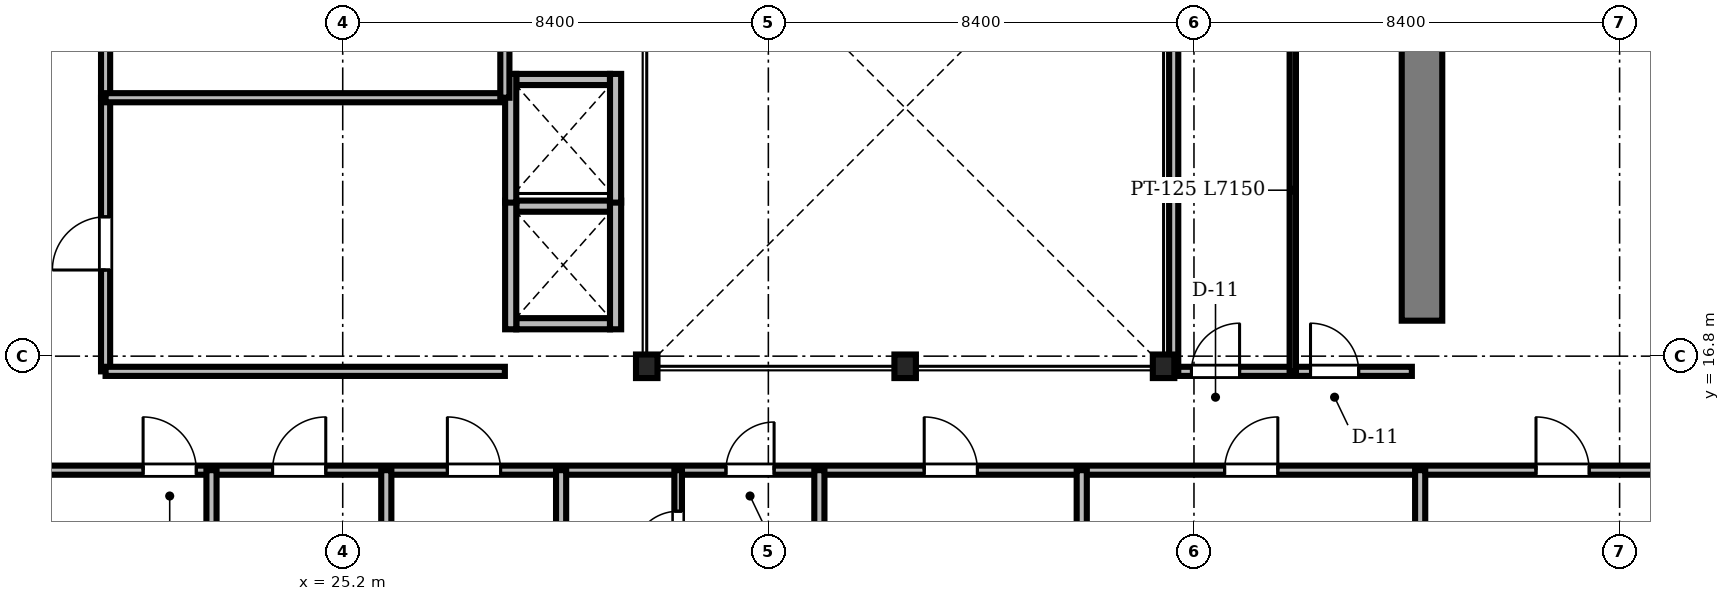
"""IFC4 building model, lengths in metres.
Left out: names, types, materials, properties, quantities, classifications, styles, units other than length and angle.
Written with IfcOpenShell. Run it as: python <this file> out.ifc"""

import sys

from ifc_helpers import new_model, si_unit, direction, frame, frame_2d, origin, origin_2d, place, context, subcontext, project, spatial, rectangle, i_section, extrude, source, transform, mapped, element, fill, save


model = new_model("IFC4")
c1 = context("Model", 3, precision=1e-05, world=origin(), true_north=direction((0.0, 1.0)))
c2 = subcontext(c1, "Body", "Model", "MODEL_VIEW")
j1 = project(units=[si_unit("LENGTHUNIT", "METRE"), si_unit("PLANEANGLEUNIT", "RADIAN")], contexts=[c1])
p1 = place(None, origin())
s1 = spatial("IfcSite", under=j1, at=p1, CompositionType="ELEMENT")
p2 = place(p1, origin())
s2 = spatial("IfcBuilding", under=s1, at=p2, CompositionType="ELEMENT")
p3 = place(p2, frame((0.0, 0.0, 111.3)))
s3 = spatial("IfcBuildingStorey", under=s2, at=p3, CompositionType="ELEMENT", Elevation=111.3)
m1 = source(origin(), c2, "Body", "SweptSolid", [
    extrude(rectangle(XDim=13.15, YDim=0.8, at=frame_2d((6.575, 0.0))), origin(), (0.0, 0.0, 1.0), 3.46),
])
p4 = place(p3, frame((46.5, 17.5, 0.0), z_axis=(0.0, 0.0, 1.0), x_axis=(0.0, 1.0, 0.0)))
e1 = element("IfcWall", 1, at=p4, inside=s3, PredefinedType="SHEAR", context=c2, shape_type="MappedRepresentation", body=[
    mapped(m1, transform((0.0, 0.0, 0.0), scale=1.0)),
])
m2 = source(origin(), c2, "Body", "SweptSolid", [
    extrude(i_section(OverallWidth=0.424, OverallDepth=0.465, WebThickness=0.035, FlangeThickness=0.056, FilletRadius=0.015, at=origin_2d()), origin(), (0.0, 0.0, 1.0), 3.46),
])
for number, where, z_axis, x_axis in (
    (2, (31.2, 16.6, 0.0), (0.0, 0.0, 1.0), (1.0, 0.0, 0.0)),
    (3, (36.3, 16.6, 0.0), (0.0, 0.0, 1.0), (1.0, 0.0, 0.0)),
    (4, (41.4, 16.6, 0.0), (0.0, 0.0, 1.0), (1.0, 0.0, 0.0)),
):
    element("IfcColumn", number, at=place(p3, frame(where, z_axis=z_axis, x_axis=x_axis)), inside=s3, PredefinedType="COLUMN", context=c2, shape_type="MappedRepresentation", body=[
        mapped(m2, transform((0.0, 0.0, 0.0), scale=1.0)),
    ])
m3 = source(origin(), c2, "Body", "SweptSolid", [
    extrude(rectangle(XDim=1.85, YDim=0.22, at=frame_2d((0.925, 0.0))), origin(), (0.0, 0.0, 1.0), 3.46),
])
for number, where, z_axis, x_axis in (
    (5, (28.625, 17.44, 0.0), (0.0, 0.0, 1.0), (1.0, 0.0, 0.0)),
    (6, (28.625, 19.76, 0.0), (0.0, 0.0, 1.0), (1.0, 0.0, 0.0)),
):
    element("IfcWall", number, at=place(p3, frame(where, z_axis=z_axis, x_axis=x_axis)), inside=s3, PredefinedType="SOLIDWALL", context=c2, shape_type="MappedRepresentation", body=[
        mapped(m3, transform((0.0, 0.0, 0.0), scale=1.0)),
    ])
m4 = source(origin(), c2, "Body", "SweptSolid", [
    extrude(rectangle(XDim=2.54, YDim=0.22, at=frame_2d((1.27, 0.0))), origin(), (0.0, 0.0, 1.0), 3.46),
])
for number, where, z_axis, x_axis in (
    (7, (28.515, 17.33, 0.0), (0.0, 0.0, 1.0), (0.0, 1.0, 0.0)),
    (8, (30.585, 17.33, 0.0), (0.0, 0.0, 1.0), (0.0, 1.0, 0.0)),
):
    element("IfcWall", number, at=place(p3, frame(where, z_axis=z_axis, x_axis=x_axis)), inside=s3, PredefinedType="SOLIDWALL", context=c2, shape_type="MappedRepresentation", body=[
        mapped(m4, transform((0.0, 0.0, 0.0), scale=1.0)),
    ])
p5 = place(p3, frame((28.625, 22.26, 0.0), z_axis=(0.0, 0.0, 1.0), x_axis=(1.0, 0.0, 0.0)))
e9 = element("IfcWall", 9, at=p5, inside=s3, PredefinedType="SOLIDWALL", context=c2, shape_type="MappedRepresentation", body=[
    mapped(m3, transform((0.0, 0.0, 0.0), scale=1.0)),
])
for number, where, z_axis, x_axis in (
    (10, (28.515, 19.83, 0.0), (0.0, 0.0, 1.0), (0.0, 1.0, 0.0)),
    (11, (30.585, 19.83, 0.0), (0.0, 0.0, 1.0), (0.0, 1.0, 0.0)),
):
    element("IfcWall", number, at=place(p3, frame(where, z_axis=z_axis, x_axis=x_axis)), inside=s3, PredefinedType="SOLIDWALL", context=c2, shape_type="MappedRepresentation", body=[
        mapped(m4, transform((0.0, 0.0, 0.0), scale=1.0)),
    ])
m5 = source(origin(), c2, "Body", "SweptSolid", [
    extrude(rectangle(XDim=46.156, YDim=0.18, at=frame_2d((23.078, 0.0))), origin(), (0.0, 0.0, 1.0), 2.702),
])
p6 = place(p3, frame((6.922, 14.55, 0.0), z_axis=(0.0, 0.0, 1.0), x_axis=(1.0, 0.0, 0.0)))
e12 = element("IfcWall", 12, at=p6, inside=s3, PredefinedType="PARTITIONING", context=c2, shape_type="MappedRepresentation", body=[
    mapped(m5, transform((0.0, 0.0, 0.0), scale=1.0)),
])
m6 = source(origin(), c2, "Body", "SweptSolid", [
    extrude(rectangle(XDim=1.05, YDim=2.2, at=frame_2d((0.525, 1.1))), frame((0.0, 0.1, 0.0), z_axis=(0.0, -1.0, 0.0), x_axis=(1.0, 0.0, 0.0)), (0.0, 0.0, 1.0), 0.2),
])
p7 = place(p6, frame((14.338, 0.0, 0.0)))
e13 = element("IfcOpeningElement", 13, at=p7, cuts=e12, PredefinedType="OPENING", context=c2, shape_type="MappedRepresentation", body=[
    mapped(m6, transform((0.0, 0.0, 0.0), scale=1.0)),
])
p8 = place(p6, frame((16.893, 0.0, 0.0)))
e14 = element("IfcOpeningElement", 14, at=p8, cuts=e12, PredefinedType="OPENING", context=c2, shape_type="MappedRepresentation", body=[
    mapped(m6, transform((0.0, 0.0, 0.0), scale=1.0)),
])
p9 = place(p6, frame((20.344, 0.0, 0.0)))
e15 = element("IfcOpeningElement", 15, at=p9, cuts=e12, PredefinedType="OPENING", context=c2, shape_type="MappedRepresentation", body=[
    mapped(m6, transform((0.0, 0.0, 0.0), scale=1.0)),
])
m7 = source(origin(), c2, "Body", "SweptSolid", [
    extrude(rectangle(XDim=0.95, YDim=2.15, at=frame_2d((0.475, 1.075))), frame((0.0, 0.1, 0.0), z_axis=(0.0, -1.0, 0.0), x_axis=(1.0, 0.0, 0.0)), (0.0, 0.0, 1.0), 0.2),
])
p10 = place(p6, frame((25.842, 0.0, 0.0)))
e16 = element("IfcOpeningElement", 16, at=p10, cuts=e12, PredefinedType="OPENING", context=c2, shape_type="MappedRepresentation", body=[
    mapped(m7, transform((0.0, 0.0, 0.0), scale=1.0)),
])
p11 = place(p6, frame((29.754, 0.0, 0.0)))
e17 = element("IfcOpeningElement", 17, at=p11, cuts=e12, PredefinedType="OPENING", context=c2, shape_type="MappedRepresentation", body=[
    mapped(m6, transform((0.0, 0.0, 0.0), scale=1.0)),
])
p12 = place(p6, frame((35.683, 0.0, 0.0)))
e18 = element("IfcOpeningElement", 18, at=p12, cuts=e12, PredefinedType="OPENING", context=c2, shape_type="MappedRepresentation", body=[
    mapped(m6, transform((0.0, 0.0, 0.0), scale=1.0)),
])
p13 = place(p6, frame((41.828, 0.0, 0.0)))
e19 = element("IfcOpeningElement", 19, at=p13, cuts=e12, PredefinedType="OPENING", context=c2, shape_type="MappedRepresentation", body=[
    mapped(m6, transform((0.0, 0.0, 0.0), scale=1.0)),
])
m8 = source(origin(), c2, "Body", "SweptSolid", [
    extrude(rectangle(XDim=6.54, YDim=0.18, at=frame_2d((3.27, 0.0))), origin(), (0.0, 0.0, 1.0), 2.852),
])
p14 = place(p3, frame((20.52, 21.9, 0.0), z_axis=(0.0, 0.0, 1.0), x_axis=(0.0, 1.0, 0.0)))
e20 = element("IfcWall", 20, at=p14, inside=s3, PredefinedType="PARTITIONING", context=c2, shape_type="MappedRepresentation", body=[
    mapped(m8, transform((0.0, 0.0, 0.0), scale=1.0)),
])
p15 = place(p14, frame((2.2, 0.0, 0.0)))
e21 = element("IfcOpeningElement", 21, at=p15, cuts=e20, PredefinedType="OPENING", context=c2, shape_type="MappedRepresentation", body=[
    mapped(m6, transform((0.0, 0.0, 0.0), scale=1.0)),
])
m9 = source(origin(), c2, "Body", "SweptSolid", [
    extrude(rectangle(XDim=5.4, YDim=0.18, at=frame_2d((2.7, 0.0))), origin(), (0.0, 0.0, 1.0), 2.852),
])
p16 = place(p3, frame((20.52, 16.5, 0.0), z_axis=(0.0, 0.0, 1.0), x_axis=(0.0, 1.0, 0.0)))
e22 = element("IfcWall", 22, at=p16, inside=s3, PredefinedType="PARTITIONING", context=c2, shape_type="MappedRepresentation", body=[
    mapped(m9, transform((0.0, 0.0, 0.0), scale=1.0)),
])
p17 = place(p16, frame((2.0, 0.0, 0.0)))
e23 = element("IfcOpeningElement", 23, at=p17, cuts=e22, PredefinedType="OPENING", context=c2, shape_type="MappedRepresentation", body=[
    mapped(m6, transform((0.0, 0.0, 0.0), scale=1.0)),
])
m10 = source(origin(), c2, "Body", "SweptSolid", [
    extrude(rectangle(XDim=4.7, YDim=0.18, at=frame_2d((2.35, 0.0))), origin(), (0.0, 0.0, 1.0), 2.852),
])
p18 = place(p3, frame((41.6, 16.5, 0.0), z_axis=(0.0, 0.0, 1.0), x_axis=(1.0, 0.0, 0.0)))
e24 = element("IfcWall", 24, at=p18, inside=s3, PredefinedType="PARTITIONING", context=c2, shape_type="MappedRepresentation", body=[
    mapped(m10, transform((0.0, 0.0, 0.0), scale=1.0)),
])
p19 = place(p18, frame((0.35, 0.0, 0.0)))
e25 = element("IfcOpeningElement", 25, at=p19, cuts=e24, PredefinedType="OPENING", context=c2, shape_type="MappedRepresentation", body=[
    mapped(m7, transform((0.0, 0.0, 0.0), scale=1.0)),
])
p20 = place(p18, frame((2.7, 0.0, 0.0)))
e26 = element("IfcOpeningElement", 26, at=p20, cuts=e24, PredefinedType="OPENING", context=c2, shape_type="MappedRepresentation", body=[
    mapped(m7, transform((0.0, 0.0, 0.0), scale=1.0)),
])
m11 = source(origin(), c2, "Body", "SweptSolid", [
    extrude(rectangle(XDim=2.36, YDim=0.15, at=frame_2d((1.18, 0.0))), origin(), (0.0, 0.0, 1.0), 3.46),
])
p21 = place(p3, frame((31.82, 12.19, 0.0), z_axis=(0.0, 0.0, 1.0), x_axis=(0.0, 1.0, 0.0)))
e27 = element("IfcWall", 27, at=p21, inside=s3, PredefinedType="PARTITIONING", context=c2, shape_type="MappedRepresentation", body=[
    mapped(m11, transform((0.0, 0.0, 0.0), scale=1.0)),
])
m12 = source(origin(), c2, "Body", "SweptSolid", [
    extrude(rectangle(XDim=0.9, YDim=2.1, at=frame_2d((0.45, 1.05))), frame((0.0, 0.085, 0.0), z_axis=(0.0, -1.0, 0.0), x_axis=(1.0, 0.0, 0.0)), (0.0, 0.0, 1.0), 0.17),
])
p22 = place(p21, frame((0.65, 0.0, 0.0)))
e28 = element("IfcOpeningElement", 28, at=p22, cuts=e27, PredefinedType="OPENING", context=c2, shape_type="MappedRepresentation", body=[
    mapped(m12, transform((0.0, 0.0, 0.0), scale=1.0)),
])
m13 = source(origin(), c2, "Body", "SweptSolid", [
    extrude(rectangle(XDim=12.428, YDim=0.2, at=frame_2d((6.214, 0.0))), origin(), (0.0, 0.0, 1.0), 2.702),
])
for number, where, z_axis, x_axis in (
    (29, (22.61, 2.122, 0.0), (0.0, 0.0, 1.0), (0.0, 1.0, 0.0)),
    (30, (26.06, 2.122, 0.0), (0.0, 0.0, 1.0), (0.0, 1.0, 0.0)),
):
    element("IfcWall", number, at=place(p3, frame(where, z_axis=z_axis, x_axis=x_axis)), inside=s3, PredefinedType="PARTITIONING", context=c2, shape_type="MappedRepresentation", body=[
        mapped(m13, transform((0.0, 0.0, 0.0), scale=1.0)),
    ])
m14 = source(origin(), c2, "Body", "SweptSolid", [
    extrude(rectangle(XDim=12.62, YDim=0.2, at=frame_2d((6.31, 0.0))), origin(), (0.0, 0.0, 1.0), 2.702),
])
p23 = place(p3, frame((29.51, 1.93, 0.0), z_axis=(0.0, 0.0, 1.0), x_axis=(0.0, 1.0, 0.0)))
e31 = element("IfcWall", 31, at=p23, inside=s3, PredefinedType="PARTITIONING", context=c2, shape_type="MappedRepresentation", body=[
    mapped(m14, transform((0.0, 0.0, 0.0), scale=1.0)),
])
for number, where, z_axis, x_axis in (
    (32, (34.607, 2.122, 0.0), (0.0, 0.0, 1.0), (0.0, 1.0, 0.0)),
    (33, (39.785, 2.122, 0.0), (0.0, 0.0, 1.0), (0.0, 1.0, 0.0)),
    (34, (46.464, 2.122, 0.0), (0.0, 0.0, 1.0), (0.0, 1.0, 0.0)),
):
    element("IfcWall", number, at=place(p3, frame(where, z_axis=z_axis, x_axis=x_axis)), inside=s3, PredefinedType="PARTITIONING", context=c2, shape_type="MappedRepresentation", body=[
        mapped(m13, transform((0.0, 0.0, 0.0), scale=1.0)),
    ])
m15 = source(origin(), c2, "Body", "SweptSolid", [
    extrude(rectangle(XDim=7.88, YDim=0.18, at=frame_2d((3.94, 0.0))), origin(), (0.0, 0.0, 1.0), 3.46),
])
for number, where, z_axis, x_axis in (
    (35, (20.52, 16.5, 0.0), (0.0, 0.0, 1.0), (1.0, 0.0, 0.0)),
    (36, (20.52, 21.9, 0.0), (0.0, 0.0, 1.0), (1.0, 0.0, 0.0)),
):
    element("IfcWall", number, at=place(p3, frame(where, z_axis=z_axis, x_axis=x_axis)), inside=s3, PredefinedType="PARTITIONING", context=c2, shape_type="MappedRepresentation", body=[
        mapped(m15, transform((0.0, 0.0, 0.0), scale=1.0)),
    ])
m16 = source(origin(), c2, "Body", "SweptSolid", [
    extrude(rectangle(XDim=7.15, YDim=0.18, at=frame_2d((3.575, 0.0))), origin(), (0.0, 0.0, 1.0), 2.852),
])
p24 = place(p3, frame((41.6, 16.5, 0.0), z_axis=(0.0, 0.0, 1.0), x_axis=(0.0, 1.0, 0.0)))
e37 = element("IfcWall", 37, at=p24, inside=s3, PredefinedType="PARTITIONING", context=c2, shape_type="MappedRepresentation", body=[
    mapped(m16, transform((0.0, 0.0, 0.0), scale=1.0)),
])
m17 = source(origin(), c2, "Body", "SweptSolid", [
    extrude(rectangle(XDim=7.15, YDim=0.125, at=frame_2d((3.575, 0.0))), origin(), (0.0, 0.0, 1.0), 2.852),
])
p25 = place(p3, frame((43.95, 16.5, 0.0), z_axis=(0.0, 0.0, 1.0), x_axis=(0.0, 1.0, 0.0)))
e38 = element("IfcWall", 38, at=p25, inside=s3, PredefinedType="PARTITIONING", context=c2, shape_type="MappedRepresentation", body=[
    mapped(m17, transform((0.0, 0.0, 0.0), scale=1.0)),
])
p26 = place(p3, frame((28.4, 21.9, 0.0), z_axis=(0.0, 0.0, 1.0), x_axis=(0.0, 1.0, 0.0)))
e39 = element("IfcWall", 39, at=p26, inside=s3, PredefinedType="PARTITIONING", context=c2, shape_type="MappedRepresentation", body=[
    mapped(m8, transform((0.0, 0.0, 0.0), scale=1.0)),
])
m18 = source(origin(), c2, "Body", "SweptSolid", [
    extrude(rectangle(XDim=1.05, YDim=2.2, at=frame_2d((0.525, 1.1))), frame((0.0, 0.025, 0.0), z_axis=(0.0, -1.0, 0.0), x_axis=(1.0, 0.0, 0.0)), (0.0, 0.0, 1.0), 0.05),
])
p27 = place(p7, origin())
e40 = element("IfcDoor", 40, at=p27, inside=s3, OperationType="SINGLE_SWING_LEFT", PredefinedType="DOOR", context=c2, shape_type="MappedRepresentation", body=[
    mapped(m18, transform((0.0, 0.0, 0.0), scale=1.0)),
])
fill(e13, e40)
p28 = place(p8, origin())
e41 = element("IfcDoor", 41, at=p28, inside=s3, OperationType="SINGLE_SWING_RIGHT", PredefinedType="DOOR", context=c2, shape_type="MappedRepresentation", body=[
    mapped(m18, transform((0.0, 0.0, 0.0), scale=1.0)),
])
fill(e14, e41)
p29 = place(p9, origin())
e42 = element("IfcDoor", 42, at=p29, inside=s3, OperationType="SINGLE_SWING_LEFT", PredefinedType="DOOR", context=c2, shape_type="MappedRepresentation", body=[
    mapped(m18, transform((0.0, 0.0, 0.0), scale=1.0)),
])
fill(e15, e42)
m19 = source(origin(), c2, "Body", "SweptSolid", [
    extrude(rectangle(XDim=0.95, YDim=2.15, at=frame_2d((0.475, 1.075))), frame((0.0, 0.025, 0.0), z_axis=(0.0, -1.0, 0.0), x_axis=(1.0, 0.0, 0.0)), (0.0, 0.0, 1.0), 0.05),
])
p30 = place(p10, origin())
e43 = element("IfcDoor", 43, at=p30, inside=s3, OperationType="SINGLE_SWING_RIGHT", PredefinedType="DOOR", context=c2, shape_type="MappedRepresentation", body=[
    mapped(m19, transform((0.0, 0.0, 0.0), scale=1.0)),
])
fill(e16, e43)
p31 = place(p11, origin())
e44 = element("IfcDoor", 44, at=p31, inside=s3, OperationType="SINGLE_SWING_LEFT", PredefinedType="DOOR", context=c2, shape_type="MappedRepresentation", body=[
    mapped(m18, transform((0.0, 0.0, 0.0), scale=1.0)),
])
fill(e17, e44)
p32 = place(p12, origin())
e45 = element("IfcDoor", 45, at=p32, inside=s3, OperationType="SINGLE_SWING_RIGHT", PredefinedType="DOOR", context=c2, shape_type="MappedRepresentation", body=[
    mapped(m18, transform((0.0, 0.0, 0.0), scale=1.0)),
])
fill(e18, e45)
p33 = place(p13, origin())
e46 = element("IfcDoor", 46, at=p33, inside=s3, OperationType="SINGLE_SWING_LEFT", PredefinedType="DOOR", context=c2, shape_type="MappedRepresentation", body=[
    mapped(m18, transform((0.0, 0.0, 0.0), scale=1.0)),
])
fill(e19, e46)
p34 = place(p17, origin())
e47 = element("IfcDoor", 47, at=p34, inside=s3, OperationType="SINGLE_SWING_LEFT", PredefinedType="DOOR", context=c2, shape_type="MappedRepresentation", body=[
    mapped(m18, transform((0.0, 0.0, 0.0), scale=1.0)),
])
fill(e23, e47)
p35 = place(p19, origin())
e48 = element("IfcDoor", 48, at=p35, inside=s3, OperationType="SINGLE_SWING_RIGHT", PredefinedType="DOOR", context=c2, shape_type="MappedRepresentation", body=[
    mapped(m19, transform((0.0, 0.0, 0.0), scale=1.0)),
])
fill(e25, e48)
p36 = place(p20, origin())
e49 = element("IfcDoor", 49, at=p36, inside=s3, OperationType="SINGLE_SWING_LEFT", PredefinedType="DOOR", context=c2, shape_type="MappedRepresentation", body=[
    mapped(m19, transform((0.0, 0.0, 0.0), scale=1.0)),
])
fill(e26, e49)
m20 = source(origin(), c2, "Body", "SweptSolid", [
    extrude(rectangle(XDim=0.9, YDim=2.1, at=frame_2d((0.45, 1.05))), frame((0.0, 0.025, 0.0), z_axis=(0.0, -1.0, 0.0), x_axis=(1.0, 0.0, 0.0)), (0.0, 0.0, 1.0), 0.05),
])
p37 = place(p22, origin())
e50 = element("IfcDoor", 50, at=p37, inside=s3, OperationType="SINGLE_SWING_LEFT", PredefinedType="DOOR", context=c2, shape_type="MappedRepresentation", body=[
    mapped(m20, transform((0.0, 0.0, 0.0), scale=1.0)),
])
fill(e28, e50)
save(model, sys.argv[1])
